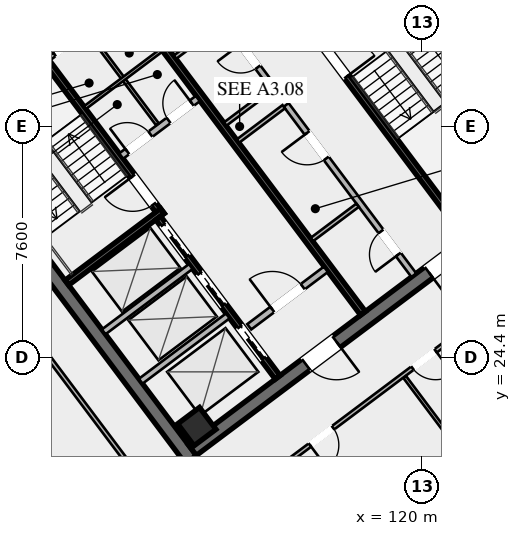
"""IFC4 building model, lengths in metres.
Left out: names, types, materials, properties, quantities, classifications, styles, units other than length and angle.
Written with IfcOpenShell. Run it as: python <this file> out.ifc"""

import sys

from ifc_helpers import new_model, si_unit, direction, frame, frame_2d, origin, origin_2d, place, context, subcontext, project, spatial, rectangle, hollow_rectangle, extrude, element, fill, save


model = new_model("IFC4")
c1 = context("Model", 3, precision=1e-05, world=origin(), true_north=direction((0.0, 1.0)))
c2 = subcontext(c1, "Body", "Model", "MODEL_VIEW")
j1 = project(units=[si_unit("LENGTHUNIT", "METRE"), si_unit("PLANEANGLEUNIT", "RADIAN")], contexts=[c1])
p1 = place(None, origin())
s1 = spatial("IfcSite", under=j1, at=p1, CompositionType="ELEMENT")
p2 = place(p1, origin())
s2 = spatial("IfcBuilding", under=s1, at=p2, CompositionType="ELEMENT")
p3 = place(p2, frame((0.0, 0.0, 232.6)))
s3 = spatial("IfcBuildingStorey", under=s2, at=p3, CompositionType="ELEMENT", Elevation=232.6)
for number, where, z_axis, x_axis in (
    (1, (112.396, 21.047, 0.0), (0.0, 0.0, 1.0), (-0.6, 0.8, 0.0)),
    (2, (115.604, 42.953, 0.0), (0.0, 0.0, 1.0), (0.6, -0.8, 0.0)),
):
    element("IfcWall", number, at=place(p3, frame(where, z_axis=z_axis, x_axis=x_axis)), inside=s3, PredefinedType="SHEAR", context=c2, shape_type="SweptSolid", body=[
        extrude(rectangle(XDim=15.6, YDim=0.45, at=frame_2d((7.8, 0.0))), origin(), (0.0, 0.0, 1.0), 3.55),
    ])
p4 = place(p3, frame((124.649, 30.518, 0.0), z_axis=(0.0, 0.0, 1.0), x_axis=(-0.8, -0.6, 0.0)))
e3 = element("IfcWall", 3, at=p4, inside=s3, PredefinedType="SHEAR", context=c2, shape_type="SweptSolid", body=[
    extrude(rectangle(XDim=15.26, YDim=0.45, at=frame_2d((7.63, 0.0))), origin(), (0.0, 0.0, 1.0), 3.55),
])
p5 = place(p4, frame((9.33, 0.0, 0.0)))
e4 = element("IfcOpeningElement", 4, at=p5, cuts=e3, PredefinedType="OPENING", context=c2, shape_type="SweptSolid", body=[
    extrude(rectangle(XDim=1.25, YDim=2.25, at=frame_2d((0.625, 1.125))), frame((0.0, 0.235, 0.0), z_axis=(0.0, -1.0, 0.0), x_axis=(1.0, 0.0, 0.0)), (0.0, 0.0, 1.0), 0.47),
])
p6 = place(p4, frame((4.28, 0.0, 0.0)))
e5 = element("IfcOpeningElement", 5, at=p6, cuts=e3, PredefinedType="OPENING", context=c2, shape_type="SweptSolid", body=[
    extrude(rectangle(XDim=1.25, YDim=2.25, at=frame_2d((0.625, 1.125))), frame((0.0, 0.235, 0.0), z_axis=(0.0, -1.0, 0.0), x_axis=(1.0, 0.0, 0.0)), (0.0, 0.0, 1.0), 0.47),
])
p7 = place(p3, frame((103.351, 33.482, 0.0), z_axis=(0.0, 0.0, 1.0), x_axis=(0.8, 0.6, 0.0)))
e6 = element("IfcWall", 6, at=p7, inside=s3, PredefinedType="SHEAR", context=c2, shape_type="SweptSolid", body=[
    extrude(rectangle(XDim=15.26, YDim=0.45, at=frame_2d((7.63, 0.0))), origin(), (0.0, 0.0, 1.0), 3.55),
])
p8 = place(p7, frame((4.68, 0.0, 0.0)))
e7 = element("IfcOpeningElement", 7, at=p8, cuts=e6, PredefinedType="OPENING", context=c2, shape_type="SweptSolid", body=[
    extrude(rectangle(XDim=1.25, YDim=2.25, at=frame_2d((0.625, 1.125))), frame((0.0, 0.235, 0.0), z_axis=(0.0, -1.0, 0.0), x_axis=(1.0, 0.0, 0.0)), (0.0, 0.0, 1.0), 0.47),
])
p9 = place(p7, frame((9.73, 0.0, 0.0)))
e8 = element("IfcOpeningElement", 8, at=p9, cuts=e6, PredefinedType="OPENING", context=c2, shape_type="SweptSolid", body=[
    extrude(rectangle(XDim=1.25, YDim=2.25, at=frame_2d((0.625, 1.125))), frame((0.0, 0.235, 0.0), z_axis=(0.0, -1.0, 0.0), x_axis=(1.0, 0.0, 0.0)), (0.0, 0.0, 1.0), 0.47),
])
p10 = place(p3, frame((112.59, 22.13, 0.0), z_axis=(0.0, 0.0, 1.0), x_axis=(0.799999996291, 0.600000004945, 0.0)))
e9 = element("IfcColumn", 9, at=p10, inside=s3, PredefinedType="COLUMN", context=c2, shape_type="SweptSolid", body=[
    extrude(hollow_rectangle(XDim=0.9, YDim=0.9, WallThickness=0.04, at=origin_2d()), origin(), (0.0, 0.0, 1.0), 3.37),
])
p11 = place(p3, frame((111.44, 29.08, 0.0), z_axis=(0.0, 0.0, 1.0), x_axis=(-0.59999041401, 0.800007189403, 0.0)))
e10 = element("IfcWall", 10, at=p11, inside=s3, PredefinedType="SHEAR", context=c2, shape_type="SweptSolid", body=[
    extrude(rectangle(XDim=8.15, YDim=0.2, at=frame_2d((4.075, 0.0))), origin(), (0.0, 0.0, 1.0), 3.37),
])
p12 = place(p11, frame((0.45, 0.0, 0.0)))
e11 = element("IfcOpeningElement", 11, at=p12, cuts=e10, PredefinedType="OPENING", context=c2, shape_type="SweptSolid", body=[
    extrude(rectangle(XDim=1.15, YDim=2.2, at=frame_2d((0.575, 1.1))), frame((0.0, 0.11, 0.0), z_axis=(0.0, -1.0, 0.0), x_axis=(1.0, 0.0, 0.0)), (0.0, 0.0, 1.0), 0.22),
])
p13 = place(p3, frame((108.316, 26.862, 0.0), z_axis=(0.0, 0.0, 1.0), x_axis=(0.800014909178, 0.599980120581, 0.0)))
e12 = element("IfcWall", 12, at=p13, inside=s3, PredefinedType="SHEAR", context=c2, shape_type="SweptSolid", body=[
    extrude(rectangle(XDim=3.93, YDim=0.2, at=frame_2d((1.965, 0.0))), origin(), (0.0, 0.0, 1.0), 3.37),
])
p14 = place(p3, frame((116.56, 34.92, 0.0), z_axis=(0.0, 0.0, 1.0), x_axis=(0.59999041401, -0.800007189403, 0.0)))
e13 = element("IfcWall", 13, at=p14, inside=s3, PredefinedType="SHEAR", context=c2, shape_type="SweptSolid", body=[
    extrude(rectangle(XDim=8.15, YDim=0.2, at=frame_2d((4.075, 0.0))), origin(), (0.0, 0.0, 1.0), 3.37),
])
p15 = place(p14, frame((0.45, 0.0, 0.0)))
e14 = element("IfcOpeningElement", 14, at=p15, cuts=e13, PredefinedType="OPENING", context=c2, shape_type="SweptSolid", body=[
    extrude(rectangle(XDim=1.15, YDim=2.2, at=frame_2d((0.575, 1.1))), frame((0.0, 0.11, 0.0), z_axis=(0.0, -1.0, 0.0), x_axis=(1.0, 0.0, 0.0)), (0.0, 0.0, 1.0), 0.22),
])
p16 = place(p3, frame((118.058, 25.856, 0.0), z_axis=(0.0, 0.0, 1.0), x_axis=(-0.600002657301, 0.799998007018, 0.0)))
e15 = element("IfcWall", 15, at=p16, inside=s3, PredefinedType="SHEAR", context=c2, shape_type="SweptSolid", body=[
    extrude(rectangle(XDim=14.7, YDim=0.2, at=frame_2d((7.35, 0.0))), origin(), (0.0, 0.0, 1.0), 3.37),
])
p17 = place(p3, frame((110.104, 31.028, 0.0), z_axis=(0.0, 0.0, 1.0), x_axis=(0.800018601094, 0.59997519774, 0.0)))
e16 = element("IfcWall", 16, at=p17, inside=s3, PredefinedType="SOLIDWALL", context=c2, shape_type="SweptSolid", body=[
    extrude(rectangle(XDim=3.15, YDim=0.22, at=frame_2d((1.575, 0.0))), origin(), (0.0, 0.0, 1.0), 2.723),
])
p18 = place(p17, frame((0.25, 0.0, 0.0)))
e17 = element("IfcOpeningElement", 17, at=p18, cuts=e16, PredefinedType="OPENING", context=c2, shape_type="SweptSolid", body=[
    extrude(rectangle(XDim=0.95, YDim=2.05, at=frame_2d((0.475, 1.025))), frame((0.0, 0.12, 0.0), z_axis=(0.0, -1.0, 0.0), x_axis=(1.0, 0.0, 0.0)), (0.0, 0.0, 1.0), 0.24),
])
p19 = place(p17, frame((1.95, 0.0, 0.0)))
e18 = element("IfcOpeningElement", 18, at=p19, cuts=e16, PredefinedType="OPENING", context=c2, shape_type="SweptSolid", body=[
    extrude(rectangle(XDim=0.95, YDim=2.05, at=frame_2d((0.475, 1.025))), frame((0.0, 0.12, 0.0), z_axis=(0.0, -1.0, 0.0), x_axis=(1.0, 0.0, 0.0)), (0.0, 0.0, 1.0), 0.24),
])
p20 = place(p3, frame((114.316, 25.412, 0.0), z_axis=(0.0, 0.0, 1.0), x_axis=(0.800018601094, 0.59997519774, 0.0)))
e19 = element("IfcWall", 19, at=p20, inside=s3, PredefinedType="SOLIDWALL", context=c2, shape_type="SweptSolid", body=[
    extrude(rectangle(XDim=3.15, YDim=0.22, at=frame_2d((1.575, 0.0))), origin(), (0.0, 0.0, 1.0), 2.723),
])
p21 = place(p20, frame((0.95, 0.0, 0.0)))
e20 = element("IfcOpeningElement", 20, at=p21, cuts=e19, PredefinedType="OPENING", context=c2, shape_type="SweptSolid", body=[
    extrude(rectangle(XDim=1.25, YDim=2.25, at=frame_2d((0.625, 1.125))), frame((0.0, 0.12, 0.0), z_axis=(0.0, -1.0, 0.0), x_axis=(1.0, 0.0, 0.0)), (0.0, 0.0, 1.0), 0.24),
])
p22 = place(p3, frame((115.25, 23.75, 0.0), z_axis=(0.0, 0.0, 1.0), x_axis=(-0.599994036198, 0.800004472816, 0.0)))
e21 = element("IfcWall", 21, at=p22, inside=s3, PredefinedType="SHEAR", context=c2, shape_type="SweptSolid", body=[
    extrude(rectangle(XDim=6.55, YDim=0.2, at=frame_2d((3.275, 0.0))), origin(), (0.0, 0.0, 1.0), 3.37),
])
p23 = place(p22, frame((4.975, 0.0, 0.0)))
e22 = element("IfcOpeningElement", 22, at=p23, cuts=e21, PredefinedType="OPENING", context=c2, shape_type="SweptSolid", body=[
    extrude(rectangle(XDim=1.3, YDim=2.25, at=frame_2d((0.65, 1.125))), frame((0.0, 0.11, 0.0), z_axis=(0.0, -1.0, 0.0), x_axis=(1.0, 0.0, 0.0)), (0.0, 0.0, 1.0), 0.22),
])
p24 = place(p22, frame((2.975, 0.0, 0.0)))
e23 = element("IfcOpeningElement", 23, at=p24, cuts=e21, PredefinedType="OPENING", context=c2, shape_type="SweptSolid", body=[
    extrude(rectangle(XDim=1.3, YDim=2.25, at=frame_2d((0.65, 1.125))), frame((0.0, 0.11, 0.0), z_axis=(0.0, -1.0, 0.0), x_axis=(1.0, 0.0, 0.0)), (0.0, 0.0, 1.0), 0.22),
])
p25 = place(p22, frame((0.775, 0.0, 0.0)))
e24 = element("IfcOpeningElement", 24, at=p25, cuts=e21, PredefinedType="OPENING", context=c2, shape_type="SweptSolid", body=[
    extrude(rectangle(XDim=1.3, YDim=2.25, at=frame_2d((0.65, 1.125))), frame((0.0, 0.11, 0.0), z_axis=(0.0, -1.0, 0.0), x_axis=(1.0, 0.0, 0.0)), (0.0, 0.0, 1.0), 0.22),
])
for number, where, z_axis, x_axis in (
    (25, (110.746, 23.622, 0.0), (0.0, 0.0, 1.0), (0.8, 0.6, 0.0)),
    (26, (109.528, 25.246, 0.0), (0.0, 0.0, 1.0), (0.8, 0.6, 0.0)),
):
    element("IfcWall", number, at=place(p3, frame(where, z_axis=z_axis, x_axis=x_axis)), inside=s3, PredefinedType="SOLIDWALL", context=c2, shape_type="SweptSolid", body=[
        extrude(rectangle(XDim=3.58, YDim=0.2, at=frame_2d((1.79, 0.0))), origin(), (0.0, 0.0, 1.0), 3.37),
    ])
p26 = place(p3, frame((107.71, 34.22, 0.0), z_axis=(0.0, 0.0, 1.0), x_axis=(0.799981399002, 0.60002480053, 0.0)))
e27 = element("IfcWall", 27, at=p26, inside=s3, PredefinedType="PARTITIONING", context=c2, shape_type="SweptSolid", body=[
    extrude(rectangle(XDim=3.15, YDim=0.135, at=frame_2d((1.575, 0.0))), origin(), (0.0, 0.0, 1.0), 2.723),
])
p27 = place(p26, frame((0.25, 0.0, 0.0)))
e28 = element("IfcOpeningElement", 28, at=p27, cuts=e27, PredefinedType="OPENING", context=c2, shape_type="SweptSolid", body=[
    extrude(rectangle(XDim=0.95, YDim=2.05, at=frame_2d((0.475, 1.025))), frame((0.0, 0.077, 0.0), z_axis=(0.0, -1.0, 0.0), x_axis=(1.0, 0.0, 0.0)), (0.0, 0.0, 1.0), 0.155),
])
p28 = place(p26, frame((1.95, 0.0, 0.0)))
e29 = element("IfcOpeningElement", 29, at=p28, cuts=e27, PredefinedType="OPENING", context=c2, shape_type="SweptSolid", body=[
    extrude(rectangle(XDim=0.95, YDim=2.05, at=frame_2d((0.475, 1.025))), frame((0.0, 0.077, 0.0), z_axis=(0.0, -1.0, 0.0), x_axis=(1.0, 0.0, 0.0)), (0.0, 0.0, 1.0), 0.155),
])
p29 = place(p3, frame((111.296, 32.072, 0.0), z_axis=(0.0, 0.0, 1.0), x_axis=(-0.59995887973, 0.800030838552, 0.0)))
e30 = element("IfcWall", 30, at=p29, inside=s3, PredefinedType="PARTITIONING", context=c2, shape_type="SweptSolid", body=[
    extrude(rectangle(XDim=3.8, YDim=0.11, at=frame_2d((1.9, 0.0))), origin(), (0.0, 0.0, 1.0), 2.723),
])
p30 = place(p3, frame((108.91, 32.62, 0.0), z_axis=(0.0, 0.0, 1.0), x_axis=(0.800018601094, 0.59997519774, 0.0)))
e31 = element("IfcWall", 31, at=p30, inside=s3, PredefinedType="PARTITIONING", context=c2, shape_type="SweptSolid", body=[
    extrude(rectangle(XDim=3.15, YDim=0.11, at=frame_2d((1.575, 0.0))), origin(), (0.0, 0.0, 1.0), 2.723),
])
p31 = place(p3, frame((119.73, 27.11, 0.0), z_axis=(0.0, 0.0, 1.0), x_axis=(-0.600005580459, 0.799995814625, 0.0)))
e32 = element("IfcWall", 32, at=p31, inside=s3, PredefinedType="SOLIDWALL", context=c2, shape_type="SweptSolid", body=[
    extrude(rectangle(XDim=7.0, YDim=0.2, at=frame_2d((3.5, 0.0))), origin(), (0.0, 0.0, 1.0), 2.723),
])
p32 = place(p31, frame((0.85, 0.0, 0.0)))
e33 = element("IfcOpeningElement", 33, at=p32, cuts=e32, PredefinedType="OPENING", context=c2, shape_type="SweptSolid", body=[
    extrude(rectangle(XDim=0.95, YDim=2.05, at=frame_2d((0.475, 1.025))), frame((0.0, 0.11, 0.0), z_axis=(0.0, -1.0, 0.0), x_axis=(1.0, 0.0, 0.0)), (0.0, 0.0, 1.0), 0.22),
])
p33 = place(p31, frame((4.8, 0.0, 0.0)))
e34 = element("IfcOpeningElement", 34, at=p33, cuts=e32, PredefinedType="OPENING", context=c2, shape_type="SweptSolid", body=[
    extrude(rectangle(XDim=1.05, YDim=2.2, at=frame_2d((0.525, 1.1))), frame((0.0, 0.11, 0.0), z_axis=(0.0, -1.0, 0.0), x_axis=(1.0, 0.0, 0.0)), (0.0, 0.0, 1.0), 0.22),
])
for number, where, z_axis, x_axis in (
    (35, (113.946, 31.522, 0.0), (0.0, 0.0, 1.0), (0.8, 0.6, 0.0)),
    (36, (116.376, 28.282, 0.0), (0.0, 0.0, 1.0), (0.8, 0.6, 0.0)),
):
    element("IfcWall", number, at=place(p3, frame(where, z_axis=z_axis, x_axis=x_axis)), inside=s3, PredefinedType="PARTITIONING", context=c2, shape_type="SweptSolid", body=[
        extrude(rectangle(XDim=1.88, YDim=0.135, at=frame_2d((0.94, 0.0))), origin(), (0.0, 0.0, 1.0), 2.723),
    ])
p34 = place(p3, frame((115.11, 33.27, 0.0), z_axis=(0.0, 0.0, 1.0), x_axis=(-0.600011160345, 0.79999162962, 0.0)))
e37 = element("IfcWall", 37, at=p34, inside=s3, PredefinedType="SOLIDWALL", context=c2, shape_type="SweptSolid", body=[
    extrude(rectangle(XDim=7.0, YDim=0.2, at=frame_2d((3.5, 0.0))), origin(), (0.0, 0.0, 1.0), 2.723),
])
p35 = place(p34, frame((0.85, 0.0, 0.0)))
e38 = element("IfcOpeningElement", 38, at=p35, cuts=e37, PredefinedType="OPENING", context=c2, shape_type="SweptSolid", body=[
    extrude(rectangle(XDim=0.95, YDim=2.05, at=frame_2d((0.475, 1.025))), frame((0.0, 0.11, 0.0), z_axis=(0.0, -1.0, 0.0), x_axis=(1.0, 0.0, 0.0)), (0.0, 0.0, 1.0), 0.22),
])
p36 = place(p34, frame((4.85, 0.0, 0.0)))
e39 = element("IfcOpeningElement", 39, at=p36, cuts=e37, PredefinedType="OPENING", context=c2, shape_type="SweptSolid", body=[
    extrude(rectangle(XDim=0.95, YDim=2.05, at=frame_2d((0.475, 1.025))), frame((0.0, 0.11, 0.0), z_axis=(0.0, -1.0, 0.0), x_axis=(1.0, 0.0, 0.0)), (0.0, 0.0, 1.0), 0.22),
])
p37 = place(p3, frame((113.526, 32.082, 0.0), z_axis=(0.0, 0.0, 1.0), x_axis=(0.800046745961, 0.599937666993, 0.0)))
e40 = element("IfcWall", 40, at=p37, inside=s3, PredefinedType="PARTITIONING", context=c2, shape_type="SweptSolid", body=[
    extrude(rectangle(XDim=1.88, YDim=0.135, at=frame_2d((0.94, 0.0))), origin(), (0.0, 0.0, 1.0), 2.723),
])
p38 = place(p3, frame((111.876, 34.282, 0.0), z_axis=(0.0, 0.0, 1.0), x_axis=(0.8, 0.6, 0.0)))
e41 = element("IfcWall", 41, at=p38, inside=s3, PredefinedType="PARTITIONING", context=c2, shape_type="SweptSolid", body=[
    extrude(rectangle(XDim=1.88, YDim=0.135, at=frame_2d((0.94, 0.0))), origin(), (0.0, 0.0, 1.0), 2.723),
])
p39 = place(p3, frame((123.382, 26.824, 0.0), z_axis=(0.0, 0.0, 1.0), x_axis=(-0.800004191227, -0.599994411657, 0.0)))
e42 = element("IfcWall", 42, at=p39, inside=s3, PredefinedType="PARTITIONING", context=c2, shape_type="SweptSolid", body=[
    extrude(rectangle(XDim=13.98, YDim=0.135, at=frame_2d((6.99, 0.0))), origin(), (0.0, 0.0, 1.0), 2.723),
])
p40 = place(p39, frame((7.887, 0.0, 0.0)))
e43 = element("IfcOpeningElement", 43, at=p40, cuts=e42, PredefinedType="OPENING", context=c2, shape_type="SweptSolid", body=[
    extrude(rectangle(XDim=0.95, YDim=2.05, at=frame_2d((0.475, 1.025))), frame((0.0, 0.077, 0.0), z_axis=(0.0, -1.0, 0.0), x_axis=(1.0, 0.0, 0.0)), (0.0, 0.0, 1.0), 0.155),
])
p41 = place(p39, frame((3.67, 0.0, 0.0)))
e44 = element("IfcOpeningElement", 44, at=p41, cuts=e42, PredefinedType="OPENING", context=c2, shape_type="SweptSolid", body=[
    extrude(rectangle(XDim=0.95, YDim=2.05, at=frame_2d((0.475, 1.025))), frame((0.0, 0.077, 0.0), z_axis=(0.0, -1.0, 0.0), x_axis=(1.0, 0.0, 0.0)), (0.0, 0.0, 1.0), 0.155),
])
p42 = place(p3, frame((122.448, 19.736, 0.0), z_axis=(0.0, 0.0, 1.0), x_axis=(-0.600015531756, 0.799988350947, 0.0)))
e45 = element("IfcWall", 45, at=p42, inside=s3, PredefinedType="PARTITIONING", context=c2, shape_type="SweptSolid", body=[
    extrude(rectangle(XDim=5.03, YDim=0.11, at=frame_2d((2.515, 0.0))), origin(), (0.0, 0.0, 1.0), 2.723),
])
p43 = place(p3, frame((112.15, 18.5, 0.0), z_axis=(0.0, 0.0, 1.0), x_axis=(-0.599998104681, 0.800001421485, 0.0)))
e46 = element("IfcWall", 46, at=p43, inside=s3, PredefinedType="PARTITIONING", context=c2, shape_type="SweptSolid", body=[
    extrude(rectangle(XDim=20.61, YDim=0.135, at=frame_2d((10.305, 0.0))), origin(), (0.0, 0.0, 1.0), 2.723),
])
p44 = place(p43, frame((19.36, 0.0, 0.0)))
e47 = element("IfcOpeningElement", 47, at=p44, cuts=e46, PredefinedType="OPENING", context=c2, shape_type="SweptSolid", body=[
    extrude(rectangle(XDim=0.95, YDim=2.05, at=frame_2d((0.475, 1.025))), frame((0.0, 0.077, 0.0), z_axis=(0.0, -1.0, 0.0), x_axis=(1.0, 0.0, 0.0)), (0.0, 0.0, 1.0), 0.155),
])
p45 = place(p5, origin())
e48 = element("IfcDoor", 48, at=p45, inside=s3, OperationType="SINGLE_SWING_LEFT", PredefinedType="DOOR", context=c2, shape_type="SweptSolid", body=[
    extrude(rectangle(XDim=1.25, YDim=2.25, at=frame_2d((0.625, 1.125))), frame((0.0, 0.025, 0.0), z_axis=(0.0, -1.0, 0.0), x_axis=(1.0, 0.0, 0.0)), (0.0, 0.0, 1.0), 0.05),
])
fill(e4, e48)
p46 = place(p6, origin())
e49 = element("IfcDoor", 49, at=p46, inside=s3, OperationType="SINGLE_SWING_RIGHT", PredefinedType="DOOR", context=c2, shape_type="SweptSolid", body=[
    extrude(rectangle(XDim=1.25, YDim=2.25, at=frame_2d((0.625, 1.125))), frame((0.0, 0.025, 0.0), z_axis=(0.0, -1.0, 0.0), x_axis=(1.0, 0.0, 0.0)), (0.0, 0.0, 1.0), 0.05),
])
fill(e5, e49)
p47 = place(p12, origin())
e50 = element("IfcDoor", 50, at=p47, inside=s3, OperationType="SINGLE_SWING_RIGHT", PredefinedType="DOOR", context=c2, shape_type="SweptSolid", body=[
    extrude(rectangle(XDim=1.15, YDim=2.2, at=frame_2d((0.575, 1.1))), frame((0.0, 0.025, 0.0), z_axis=(0.0, -1.0, 0.0), x_axis=(1.0, 0.0, 0.0)), (0.0, 0.0, 1.0), 0.05),
])
fill(e11, e50)
p48 = place(p15, origin())
e51 = element("IfcDoor", 51, at=p48, inside=s3, OperationType="SINGLE_SWING_RIGHT", PredefinedType="DOOR", context=c2, shape_type="SweptSolid", body=[
    extrude(rectangle(XDim=1.15, YDim=2.2, at=frame_2d((0.575, 1.1))), frame((0.0, 0.025, 0.0), z_axis=(0.0, -1.0, 0.0), x_axis=(1.0, 0.0, 0.0)), (0.0, 0.0, 1.0), 0.05),
])
fill(e14, e51)
p49 = place(p21, origin())
e52 = element("IfcDoor", 52, at=p49, inside=s3, OperationType="SINGLE_SWING_LEFT", PredefinedType="DOOR", context=c2, shape_type="SweptSolid", body=[
    extrude(rectangle(XDim=1.25, YDim=2.25, at=frame_2d((0.625, 1.125))), frame((0.0, 0.025, 0.0), z_axis=(0.0, -1.0, 0.0), x_axis=(1.0, 0.0, 0.0)), (0.0, 0.0, 1.0), 0.05),
])
fill(e20, e52)
p50 = place(p27, origin())
e53 = element("IfcDoor", 53, at=p50, inside=s3, OperationType="SINGLE_SWING_LEFT", PredefinedType="DOOR", context=c2, shape_type="SweptSolid", body=[
    extrude(rectangle(XDim=0.95, YDim=2.05, at=frame_2d((0.475, 1.025))), frame((0.0, 0.025, 0.0), z_axis=(0.0, -1.0, 0.0), x_axis=(1.0, 0.0, 0.0)), (0.0, 0.0, 1.0), 0.05),
])
fill(e28, e53)
p51 = place(p18, origin())
e54 = element("IfcDoor", 54, at=p51, inside=s3, OperationType="SINGLE_SWING_LEFT", PredefinedType="DOOR", context=c2, shape_type="SweptSolid", body=[
    extrude(rectangle(XDim=0.95, YDim=2.05, at=frame_2d((0.475, 1.025))), frame((0.0, 0.025, 0.0), z_axis=(0.0, -1.0, 0.0), x_axis=(1.0, 0.0, 0.0)), (0.0, 0.0, 1.0), 0.05),
])
fill(e17, e54)
p52 = place(p19, origin())
e55 = element("IfcDoor", 55, at=p52, inside=s3, OperationType="SINGLE_SWING_RIGHT", PredefinedType="DOOR", context=c2, shape_type="SweptSolid", body=[
    extrude(rectangle(XDim=0.95, YDim=2.05, at=frame_2d((0.475, 1.025))), frame((0.0, 0.025, 0.0), z_axis=(0.0, -1.0, 0.0), x_axis=(1.0, 0.0, 0.0)), (0.0, 0.0, 1.0), 0.05),
])
fill(e18, e55)
p53 = place(p32, origin())
e56 = element("IfcDoor", 56, at=p53, inside=s3, OperationType="SINGLE_SWING_LEFT", PredefinedType="DOOR", context=c2, shape_type="SweptSolid", body=[
    extrude(rectangle(XDim=0.95, YDim=2.05, at=frame_2d((0.475, 1.025))), frame((0.0, 0.025, 0.0), z_axis=(0.0, -1.0, 0.0), x_axis=(1.0, 0.0, 0.0)), (0.0, 0.0, 1.0), 0.05),
])
fill(e33, e56)
p54 = place(p33, origin())
e57 = element("IfcDoor", 57, at=p54, inside=s3, OperationType="SINGLE_SWING_RIGHT", PredefinedType="DOOR", context=c2, shape_type="SweptSolid", body=[
    extrude(rectangle(XDim=1.05, YDim=2.2, at=frame_2d((0.525, 1.1))), frame((0.0, 0.025, 0.0), z_axis=(0.0, -1.0, 0.0), x_axis=(1.0, 0.0, 0.0)), (0.0, 0.0, 1.0), 0.05),
])
fill(e34, e57)
p55 = place(p35, origin())
e58 = element("IfcDoor", 58, at=p55, inside=s3, OperationType="SINGLE_SWING_RIGHT", PredefinedType="DOOR", context=c2, shape_type="SweptSolid", body=[
    extrude(rectangle(XDim=0.95, YDim=2.05, at=frame_2d((0.475, 1.025))), frame((0.0, 0.025, 0.0), z_axis=(0.0, -1.0, 0.0), x_axis=(1.0, 0.0, 0.0)), (0.0, 0.0, 1.0), 0.05),
])
fill(e38, e58)
p56 = place(p40, origin())
e59 = element("IfcDoor", 59, at=p56, inside=s3, OperationType="SINGLE_SWING_RIGHT", PredefinedType="DOOR", context=c2, shape_type="SweptSolid", body=[
    extrude(rectangle(XDim=0.95, YDim=2.05, at=frame_2d((0.475, 1.025))), frame((0.0, 0.025, 0.0), z_axis=(0.0, -1.0, 0.0), x_axis=(1.0, 0.0, 0.0)), (0.0, 0.0, 1.0), 0.05),
])
fill(e43, e59)
p57 = place(p41, origin())
e60 = element("IfcDoor", 60, at=p57, inside=s3, OperationType="SINGLE_SWING_LEFT", PredefinedType="DOOR", context=c2, shape_type="SweptSolid", body=[
    extrude(rectangle(XDim=0.95, YDim=2.05, at=frame_2d((0.475, 1.025))), frame((0.0, 0.025, 0.0), z_axis=(0.0, -1.0, 0.0), x_axis=(1.0, 0.0, 0.0)), (0.0, 0.0, 1.0), 0.05),
])
fill(e44, e60)
p58 = place(p23, origin())
e61 = element("IfcDoor", 61, at=p58, inside=s3, OperationType="SLIDING_TO_LEFT", PredefinedType="DOOR", context=c2, shape_type="SweptSolid", body=[
    extrude(rectangle(XDim=1.3, YDim=2.25, at=frame_2d((0.65, 1.125))), frame((0.0, 0.025, 0.0), z_axis=(0.0, -1.0, 0.0), x_axis=(1.0, 0.0, 0.0)), (0.0, 0.0, 1.0), 0.05),
])
fill(e22, e61)
p59 = place(p24, origin())
e62 = element("IfcDoor", 62, at=p59, inside=s3, OperationType="SLIDING_TO_LEFT", PredefinedType="DOOR", context=c2, shape_type="SweptSolid", body=[
    extrude(rectangle(XDim=1.3, YDim=2.25, at=frame_2d((0.65, 1.125))), frame((0.0, 0.025, 0.0), z_axis=(0.0, -1.0, 0.0), x_axis=(1.0, 0.0, 0.0)), (0.0, 0.0, 1.0), 0.05),
])
fill(e23, e62)
p60 = place(p25, origin())
e63 = element("IfcDoor", 63, at=p60, inside=s3, OperationType="SLIDING_TO_LEFT", PredefinedType="DOOR", context=c2, shape_type="SweptSolid", body=[
    extrude(rectangle(XDim=1.3, YDim=2.25, at=frame_2d((0.65, 1.125))), frame((0.0, 0.025, 0.0), z_axis=(0.0, -1.0, 0.0), x_axis=(1.0, 0.0, 0.0)), (0.0, 0.0, 1.0), 0.05),
])
fill(e24, e63)
save(model, sys.argv[1])
